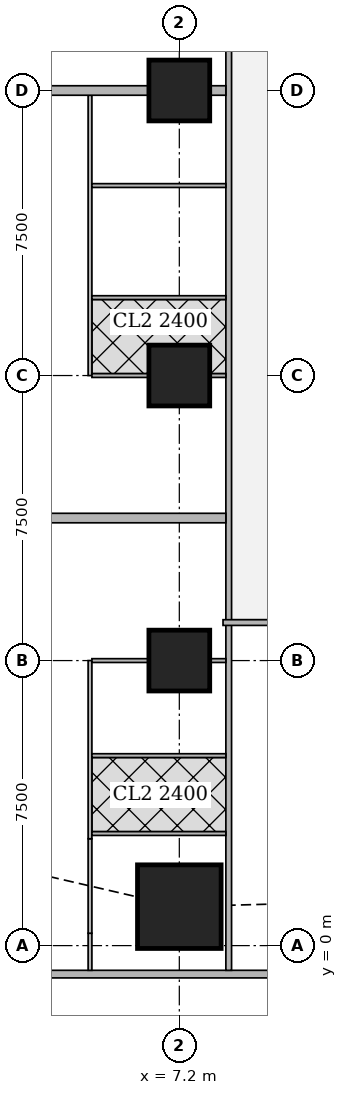
"""IFC4 building model, lengths in metres.
Left out: names, types, materials, properties, quantities, classifications, styles, units other than length and angle.
Written with IfcOpenShell. Run it as: python <this file> out.ifc"""

import sys

from ifc_helpers import new_model, si_unit, direction, frame, frame_2d, origin, origin_2d, place, context, subcontext, project, spatial, rectangle, extrude, element, fill, save


model = new_model("IFC4")
c1 = context("Model", 3, precision=1e-05, world=origin(), true_north=direction((0.0, 1.0)))
c2 = subcontext(c1, "Body", "Model", "MODEL_VIEW")
j1 = project(units=[si_unit("LENGTHUNIT", "METRE"), si_unit("PLANEANGLEUNIT", "RADIAN")], contexts=[c1])
p1 = place(None, origin())
s1 = spatial("IfcSite", under=j1, at=p1, CompositionType="ELEMENT")
p2 = place(p1, origin())
s2 = spatial("IfcBuilding", under=s1, at=p2, CompositionType="ELEMENT")
p3 = place(p2, frame((0.0, 0.0, 111.65)))
s3 = spatial("IfcBuildingStorey", under=s2, at=p3, CompositionType="ELEMENT", Elevation=111.65)
p4 = place(p3, frame((7.2, 1.025, 0.0), z_axis=(0.0, 0.0, 1.0), x_axis=(1.0, 0.0, 0.0)))
e1 = element("IfcColumn", 1, at=p4, inside=s3, PredefinedType="COLUMN", context=c2, shape_type="SweptSolid", body=[
    extrude(rectangle(XDim=2.2, YDim=2.2, at=origin_2d()), origin(), (0.0, 0.0, 1.0), 3.75),
])
for number, where, z_axis, x_axis in (
    (2, (7.2, 7.5, 0.0), (0.0, 0.0, 1.0), (1.0, 0.0, 0.0)),
    (3, (7.2, 15.0, 0.0), (0.0, 0.0, 1.0), (1.0, 0.0, 0.0)),
    (4, (7.2, 22.5, 0.0), (0.0, 0.0, 1.0), (1.0, 0.0, 0.0)),
):
    element("IfcColumn", number, at=place(p3, frame(where, z_axis=z_axis, x_axis=x_axis)), inside=s3, PredefinedType="COLUMN", context=c2, shape_type="SweptSolid", body=[
        extrude(rectangle(XDim=1.6, YDim=1.6, at=origin_2d()), origin(), (0.0, 0.0, 1.0), 3.75),
    ])
p5 = place(p3, frame((2.163, -0.75, 0.0), z_axis=(0.0, 0.0, 1.0), x_axis=(1.0, 0.0, 0.0)))
e5 = element("IfcWall", 5, at=p5, inside=s3, PredefinedType="SOLIDWALL", context=c2, shape_type="SweptSolid", body=[
    extrude(rectangle(XDim=45.628, YDim=0.2, at=frame_2d((22.814, 0.0))), origin(), (0.0, 0.0, 1.0), 3.5),
])
p6 = place(p5, frame((9.537, 0.0, 0.9)))
e6 = element("IfcOpeningElement", 6, at=p6, cuts=e5, PredefinedType="OPENING", context=c2, shape_type="SweptSolid", body=[
    extrude(rectangle(XDim=1.8, YDim=1.5, at=frame_2d((0.9, 0.75))), frame((0.0, 0.11, 0.0), z_axis=(0.0, -1.0, 0.0), x_axis=(1.0, 0.0, 0.0)), (0.0, 0.0, 1.0), 0.22),
])
p7 = place(p5, frame((13.137, 0.0, 0.9)))
e7 = element("IfcOpeningElement", 7, at=p7, cuts=e5, PredefinedType="OPENING", context=c2, shape_type="SweptSolid", body=[
    extrude(rectangle(XDim=1.8, YDim=1.5, at=frame_2d((0.9, 0.75))), frame((0.0, 0.11, 0.0), z_axis=(0.0, -1.0, 0.0), x_axis=(1.0, 0.0, 0.0)), (0.0, 0.0, 1.0), 0.22),
])
p8 = place(p5, frame((16.737, 0.0, 0.9)))
e8 = element("IfcOpeningElement", 8, at=p8, cuts=e5, PredefinedType="OPENING", context=c2, shape_type="SweptSolid", body=[
    extrude(rectangle(XDim=1.8, YDim=1.5, at=frame_2d((0.9, 0.75))), frame((0.0, 0.11, 0.0), z_axis=(0.0, -1.0, 0.0), x_axis=(1.0, 0.0, 0.0)), (0.0, 0.0, 1.0), 0.22),
])
p9 = place(p5, frame((20.337, 0.0, 0.9)))
e9 = element("IfcOpeningElement", 9, at=p9, cuts=e5, PredefinedType="OPENING", context=c2, shape_type="SweptSolid", body=[
    extrude(rectangle(XDim=1.8, YDim=1.5, at=frame_2d((0.9, 0.75))), frame((0.0, 0.11, 0.0), z_axis=(0.0, -1.0, 0.0), x_axis=(1.0, 0.0, 0.0)), (0.0, 0.0, 1.0), 0.22),
])
p10 = place(p5, frame((23.937, 0.0, 0.9)))
e10 = element("IfcOpeningElement", 10, at=p10, cuts=e5, PredefinedType="OPENING", context=c2, shape_type="SweptSolid", body=[
    extrude(rectangle(XDim=1.8, YDim=1.5, at=frame_2d((0.9, 0.75))), frame((0.0, 0.11, 0.0), z_axis=(0.0, -1.0, 0.0), x_axis=(1.0, 0.0, 0.0)), (0.0, 0.0, 1.0), 0.22),
])
p11 = place(p5, frame((27.537, 0.0, 0.9)))
e11 = element("IfcOpeningElement", 11, at=p11, cuts=e5, PredefinedType="OPENING", context=c2, shape_type="SweptSolid", body=[
    extrude(rectangle(XDim=1.8, YDim=1.5, at=frame_2d((0.9, 0.75))), frame((0.0, 0.11, 0.0), z_axis=(0.0, -1.0, 0.0), x_axis=(1.0, 0.0, 0.0)), (0.0, 0.0, 1.0), 0.22),
])
p12 = place(p5, frame((31.137, 0.0, 0.9)))
e12 = element("IfcOpeningElement", 12, at=p12, cuts=e5, PredefinedType="OPENING", context=c2, shape_type="SweptSolid", body=[
    extrude(rectangle(XDim=1.8, YDim=1.5, at=frame_2d((0.9, 0.75))), frame((0.0, 0.11, 0.0), z_axis=(0.0, -1.0, 0.0), x_axis=(1.0, 0.0, 0.0)), (0.0, 0.0, 1.0), 0.22),
])
p13 = place(p5, frame((34.737, 0.0, 0.9)))
e13 = element("IfcOpeningElement", 13, at=p13, cuts=e5, PredefinedType="OPENING", context=c2, shape_type="SweptSolid", body=[
    extrude(rectangle(XDim=1.8, YDim=1.5, at=frame_2d((0.9, 0.75))), frame((0.0, 0.11, 0.0), z_axis=(0.0, -1.0, 0.0), x_axis=(1.0, 0.0, 0.0)), (0.0, 0.0, 1.0), 0.22),
])
p14 = place(p3, frame((8.5, -0.65, 0.0), z_axis=(0.0, 0.0, 1.0), x_axis=(0.0, 1.0, 0.0)))
e14 = element("IfcWall", 14, at=p14, inside=s3, PredefinedType="SOLIDWALL", context=c2, shape_type="SweptSolid", body=[
    extrude(rectangle(XDim=46.3, YDim=0.15, at=frame_2d((23.15, 0.0))), origin(), (0.0, 0.0, 1.0), 2.2),
])
p15 = place(p14, frame((9.525, 0.0, 0.0)))
e15 = element("IfcOpeningElement", 15, at=p15, cuts=e14, PredefinedType="OPENING", context=c2, shape_type="SweptSolid", body=[
    extrude(rectangle(XDim=1.0, YDim=2.1, at=frame_2d((0.5, 1.05))), frame((0.0, 0.085, 0.0), z_axis=(0.0, -1.0, 0.0), x_axis=(1.0, 0.0, 0.0)), (0.0, 0.0, 1.0), 0.17),
])
p16 = place(p14, frame((13.275, 0.0, 0.0)))
e16 = element("IfcOpeningElement", 16, at=p16, cuts=e14, PredefinedType="OPENING", context=c2, shape_type="SweptSolid", body=[
    extrude(rectangle(XDim=1.0, YDim=2.1, at=frame_2d((0.5, 1.05))), frame((0.0, 0.085, 0.0), z_axis=(0.0, -1.0, 0.0), x_axis=(1.0, 0.0, 0.0)), (0.0, 0.0, 1.0), 0.17),
])
p17 = place(p14, frame((25.15, 0.0, 0.0)))
e17 = element("IfcOpeningElement", 17, at=p17, cuts=e14, PredefinedType="OPENING", context=c2, shape_type="SweptSolid", body=[
    extrude(rectangle(XDim=1.0, YDim=2.1, at=frame_2d((0.5, 1.05))), frame((0.0, 0.085, 0.0), z_axis=(0.0, -1.0, 0.0), x_axis=(1.0, 0.0, 0.0)), (0.0, 0.0, 1.0), 0.17),
])
p18 = place(p3, frame((40.053, 8.5, 0.0), z_axis=(0.0, 0.0, 1.0), x_axis=(-1.0, 0.0, 0.0)))
e18 = element("IfcWall", 18, at=p18, inside=s3, PredefinedType="SOLIDWALL", context=c2, shape_type="SweptSolid", body=[
    extrude(rectangle(XDim=31.703, YDim=0.15, at=frame_2d((15.852, 0.0))), origin(), (0.0, 0.0, 1.0), 3.5),
])
p19 = place(p18, frame((28.103, 0.0, 0.0)))
e19 = element("IfcOpeningElement", 19, at=p19, cuts=e18, PredefinedType="OPENING", context=c2, shape_type="SweptSolid", body=[
    extrude(rectangle(XDim=1.0, YDim=2.1, at=frame_2d((0.5, 1.05))), frame((0.0, 0.085, 0.0), z_axis=(0.0, -1.0, 0.0), x_axis=(1.0, 0.0, 0.0)), (0.0, 0.0, 1.0), 0.17),
])
p20 = place(p18, frame((19.754, 0.0, 0.0)))
e20 = element("IfcOpeningElement", 20, at=p20, cuts=e18, PredefinedType="OPENING", context=c2, shape_type="SweptSolid", body=[
    extrude(rectangle(XDim=1.0, YDim=2.1, at=frame_2d((0.5, 1.05))), frame((0.0, 0.085, 0.0), z_axis=(0.0, -1.0, 0.0), x_axis=(1.0, 0.0, 0.0)), (0.0, 0.0, 1.0), 0.17),
])
p21 = place(p18, frame((8.353, 0.0, 0.0)))
e21 = element("IfcOpeningElement", 21, at=p21, cuts=e18, PredefinedType="OPENING", context=c2, shape_type="SweptSolid", body=[
    extrude(rectangle(XDim=1.0, YDim=2.1, at=frame_2d((0.5, 1.05))), frame((0.0, 0.085, 0.0), z_axis=(0.0, -1.0, 0.0), x_axis=(1.0, 0.0, 0.0)), (0.0, 0.0, 1.0), 0.17),
])
p22 = place(p3, frame((4.85, -0.65, 0.0), z_axis=(0.0, 0.0, 1.0), x_axis=(0.0, 1.0, 0.0)))
e22 = element("IfcWall", 22, at=p22, inside=s3, PredefinedType="PARTITIONING", context=c2, shape_type="SweptSolid", body=[
    extrude(rectangle(XDim=0.976, YDim=0.1, at=frame_2d((0.488, 0.0))), origin(), (0.0, 0.0, 1.0), 3.5),
])
p23 = place(p3, frame((4.85, 0.326, 0.0), z_axis=(0.0, 0.0, 1.0), x_axis=(0.0, 1.0, 0.0)))
e23 = element("IfcWall", 23, at=p23, inside=s3, PredefinedType="PARTITIONING", context=c2, shape_type="SweptSolid", body=[
    extrude(rectangle(XDim=2.486, YDim=0.1, at=frame_2d((1.243, 0.0))), origin(), (0.0, 0.0, 1.0), 2.05),
])
p24 = place(p3, frame((4.85, 2.812, 0.0), z_axis=(0.0, 0.0, 1.0), x_axis=(0.0, 1.0, 0.0)))
e24 = element("IfcWall", 24, at=p24, inside=s3, PredefinedType="PARTITIONING", context=c2, shape_type="SweptSolid", body=[
    extrude(rectangle(XDim=4.688, YDim=0.1, at=frame_2d((2.344, 0.0))), origin(), (0.0, 0.0, 1.0), 3.5),
])
p25 = place(p24, frame((2.987, 0.0, 0.0)))
e25 = element("IfcOpeningElement", 25, at=p25, cuts=e24, PredefinedType="OPENING", context=c2, shape_type="SweptSolid", body=[
    extrude(rectangle(XDim=0.9, YDim=2.1, at=frame_2d((0.45, 1.05))), frame((0.0, 0.06, 0.0), z_axis=(0.0, -1.0, 0.0), x_axis=(1.0, 0.0, 0.0)), (0.0, 0.0, 1.0), 0.12),
])
p26 = place(p24, frame((0.712, 0.0, 0.0)))
e26 = element("IfcOpeningElement", 26, at=p26, cuts=e24, PredefinedType="OPENING", context=c2, shape_type="SweptSolid", body=[
    extrude(rectangle(XDim=0.9, YDim=2.1, at=frame_2d((0.45, 1.05))), frame((0.0, 0.06, 0.0), z_axis=(0.0, -1.0, 0.0), x_axis=(1.0, 0.0, 0.0)), (0.0, 0.0, 1.0), 0.12),
])
p27 = place(p3, frame((4.9, 4.999, 0.0), z_axis=(0.0, 0.0, 1.0), x_axis=(1.0, 0.0, 0.0)))
e27 = element("IfcWall", 27, at=p27, inside=s3, PredefinedType="PARTITIONING", context=c2, shape_type="SweptSolid", body=[
    extrude(rectangle(XDim=3.525, YDim=0.1, at=frame_2d((1.763, 0.0))), origin(), (0.0, 0.0, 1.0), 3.5),
])
p28 = place(p3, frame((4.9, 7.5, 0.0), z_axis=(0.0, 0.0, 1.0), x_axis=(1.0, 0.0, 0.0)))
e28 = element("IfcWall", 28, at=p28, inside=s3, PredefinedType="PARTITIONING", context=c2, shape_type="SweptSolid", body=[
    extrude(rectangle(XDim=1.499, YDim=0.1, at=frame_2d((0.75, 0.0))), origin(), (0.0, 0.0, 1.0), 3.5),
])
p29 = place(p3, frame((8.001, 7.5, 0.0), z_axis=(0.0, 0.0, 1.0), x_axis=(1.0, 0.0, 0.0)))
e29 = element("IfcWall", 29, at=p29, inside=s3, PredefinedType="PARTITIONING", context=c2, shape_type="SweptSolid", body=[
    extrude(rectangle(XDim=0.424, YDim=0.1, at=frame_2d((0.212, 0.0))), origin(), (0.0, 0.0, 1.0), 3.5),
])
p30 = place(p3, frame((4.9, 2.949, 0.0), z_axis=(0.0, 0.0, 1.0), x_axis=(1.0, 0.0, 0.0)))
e30 = element("IfcWall", 30, at=p30, inside=s3, PredefinedType="PARTITIONING", context=c2, shape_type="SweptSolid", body=[
    extrude(rectangle(XDim=3.525, YDim=0.1, at=frame_2d((1.763, 0.0))), origin(), (0.0, 0.0, 1.0), 3.5),
])
p31 = place(p30, frame((0.45, 0.0, 0.0)))
e31 = element("IfcOpeningElement", 31, at=p31, cuts=e30, PredefinedType="OPENING", context=c2, shape_type="SweptSolid", body=[
    extrude(rectangle(XDim=0.9, YDim=2.1, at=frame_2d((0.45, 1.05))), frame((0.0, 0.06, 0.0), z_axis=(0.0, -1.0, 0.0), x_axis=(1.0, 0.0, 0.0)), (0.0, 0.0, 1.0), 0.12),
])
p32 = place(p3, frame((4.85, 15.0, 0.0), z_axis=(0.0, 0.0, 1.0), x_axis=(0.0, 1.0, 0.0)))
e32 = element("IfcWall", 32, at=p32, inside=s3, PredefinedType="PARTITIONING", context=c2, shape_type="SweptSolid", body=[
    extrude(rectangle(XDim=7.375, YDim=0.1, at=frame_2d((3.688, 0.0))), origin(), (0.0, 0.0, 1.0), 3.5),
])
p33 = place(p32, frame((0.575, 0.0, 0.0)))
e33 = element("IfcOpeningElement", 33, at=p33, cuts=e32, PredefinedType="OPENING", context=c2, shape_type="SweptSolid", body=[
    extrude(rectangle(XDim=0.9, YDim=2.1, at=frame_2d((0.45, 1.05))), frame((0.0, 0.06, 0.0), z_axis=(0.0, -1.0, 0.0), x_axis=(1.0, 0.0, 0.0)), (0.0, 0.0, 1.0), 0.12),
])
p34 = place(p32, frame((5.799, 0.0, 0.0)))
e34 = element("IfcOpeningElement", 34, at=p34, cuts=e32, PredefinedType="OPENING", context=c2, shape_type="SweptSolid", body=[
    extrude(rectangle(XDim=0.9, YDim=2.1, at=frame_2d((0.45, 1.05))), frame((0.0, 0.06, 0.0), z_axis=(0.0, -1.0, 0.0), x_axis=(1.0, 0.0, 0.0)), (0.0, 0.0, 1.0), 0.12),
])
p35 = place(p32, frame((3.074, 0.0, 0.0)))
e35 = element("IfcOpeningElement", 35, at=p35, cuts=e32, PredefinedType="OPENING", context=c2, shape_type="SweptSolid", body=[
    extrude(rectangle(XDim=0.9, YDim=2.1, at=frame_2d((0.45, 1.05))), frame((0.0, 0.06, 0.0), z_axis=(0.0, -1.0, 0.0), x_axis=(1.0, 0.0, 0.0)), (0.0, 0.0, 1.0), 0.12),
])
p36 = place(p3, frame((4.9, 15.0, 0.0), z_axis=(0.0, 0.0, 1.0), x_axis=(1.0, 0.0, 0.0)))
e36 = element("IfcWall", 36, at=p36, inside=s3, PredefinedType="PARTITIONING", context=c2, shape_type="SweptSolid", body=[
    extrude(rectangle(XDim=1.499, YDim=0.1, at=frame_2d((0.75, 0.0))), origin(), (0.0, 0.0, 1.0), 3.5),
])
p37 = place(p3, frame((8.001, 15.0, 0.0), z_axis=(0.0, 0.0, 1.0), x_axis=(1.0, 0.0, 0.0)))
e37 = element("IfcWall", 37, at=p37, inside=s3, PredefinedType="PARTITIONING", context=c2, shape_type="SweptSolid", body=[
    extrude(rectangle(XDim=0.424, YDim=0.1, at=frame_2d((0.212, 0.0))), origin(), (0.0, 0.0, 1.0), 3.5),
])
for number, where, z_axis, x_axis in (
    (38, (4.9, 19.999, 0.0), (0.0, 0.0, 1.0), (1.0, 0.0, 0.0)),
    (39, (4.9, 17.05, 0.0), (0.0, 0.0, 1.0), (1.0, 0.0, 0.0)),
):
    element("IfcWall", number, at=place(p3, frame(where, z_axis=z_axis, x_axis=x_axis)), inside=s3, PredefinedType="PARTITIONING", context=c2, shape_type="SweptSolid", body=[
        extrude(rectangle(XDim=3.525, YDim=0.1, at=frame_2d((1.763, 0.0))), origin(), (0.0, 0.0, 1.0), 3.5),
    ])
p38 = place(p3, frame((3.65, 11.25, 0.0), z_axis=(0.0, 0.0, 1.0), x_axis=(1.0, 0.0, 0.0)))
e40 = element("IfcWall", 40, at=p38, inside=s3, PredefinedType="SOLIDWALL", context=c2, shape_type="SweptSolid", body=[
    extrude(rectangle(XDim=4.775, YDim=0.25, at=frame_2d((2.388, 0.0))), origin(), (0.0, 0.0, 1.0), 3.5),
])
p39 = place(p3, frame((3.65, 22.5, 0.0), z_axis=(0.0, 0.0, 1.0), x_axis=(1.0, 0.0, 0.0)))
e41 = element("IfcWall", 41, at=p39, inside=s3, PredefinedType="SOLIDWALL", context=c2, shape_type="SweptSolid", body=[
    extrude(rectangle(XDim=2.749, YDim=0.25, at=frame_2d((1.375, 0.0))), origin(), (0.0, 0.0, 1.0), 3.5),
])
p40 = place(p3, frame((8.001, 22.5, 0.0), z_axis=(0.0, 0.0, 1.0), x_axis=(1.0, 0.0, 0.0)))
e42 = element("IfcWall", 42, at=p40, inside=s3, PredefinedType="SOLIDWALL", context=c2, shape_type="SweptSolid", body=[
    extrude(rectangle(XDim=0.424, YDim=0.25, at=frame_2d((0.212, 0.0))), origin(), (0.0, 0.0, 1.0), 3.5),
])
p41 = place(p25, origin())
e43 = element("IfcDoor", 43, at=p41, inside=s3, OperationType="SINGLE_SWING_LEFT", PredefinedType="DOOR", context=c2, shape_type="SweptSolid", body=[
    extrude(rectangle(XDim=0.9, YDim=2.1, at=frame_2d((0.45, 1.05))), frame((0.0, 0.025, 0.0), z_axis=(0.0, -1.0, 0.0), x_axis=(1.0, 0.0, 0.0)), (0.0, 0.0, 1.0), 0.05),
])
fill(e25, e43)
p42 = place(p26, origin())
e44 = element("IfcDoor", 44, at=p42, inside=s3, OperationType="SINGLE_SWING_RIGHT", PredefinedType="DOOR", context=c2, shape_type="SweptSolid", body=[
    extrude(rectangle(XDim=0.9, YDim=2.1, at=frame_2d((0.45, 1.05))), frame((0.0, 0.025, 0.0), z_axis=(0.0, -1.0, 0.0), x_axis=(1.0, 0.0, 0.0)), (0.0, 0.0, 1.0), 0.05),
])
fill(e26, e44)
p43 = place(p31, origin())
e45 = element("IfcDoor", 45, at=p43, inside=s3, OperationType="SINGLE_SWING_LEFT", PredefinedType="DOOR", context=c2, shape_type="SweptSolid", body=[
    extrude(rectangle(XDim=0.9, YDim=2.1, at=frame_2d((0.45, 1.05))), frame((0.0, 0.025, 0.0), z_axis=(0.0, -1.0, 0.0), x_axis=(1.0, 0.0, 0.0)), (0.0, 0.0, 1.0), 0.05),
])
fill(e31, e45)
p44 = place(p15, origin())
e46 = element("IfcDoor", 46, at=p44, inside=s3, OperationType="SINGLE_SWING_LEFT", PredefinedType="DOOR", context=c2, shape_type="SweptSolid", body=[
    extrude(rectangle(XDim=1.0, YDim=2.1, at=frame_2d((0.5, 1.05))), frame((0.0, 0.025, 0.0), z_axis=(0.0, -1.0, 0.0), x_axis=(1.0, 0.0, 0.0)), (0.0, 0.0, 1.0), 0.05),
])
fill(e15, e46)
p45 = place(p33, origin())
e47 = element("IfcDoor", 47, at=p45, inside=s3, OperationType="SINGLE_SWING_RIGHT", PredefinedType="DOOR", context=c2, shape_type="SweptSolid", body=[
    extrude(rectangle(XDim=0.9, YDim=2.1, at=frame_2d((0.45, 1.05))), frame((0.0, 0.025, 0.0), z_axis=(0.0, -1.0, 0.0), x_axis=(1.0, 0.0, 0.0)), (0.0, 0.0, 1.0), 0.05),
])
fill(e33, e47)
p46 = place(p34, origin())
e48 = element("IfcDoor", 48, at=p46, inside=s3, OperationType="SINGLE_SWING_LEFT", PredefinedType="DOOR", context=c2, shape_type="SweptSolid", body=[
    extrude(rectangle(XDim=0.9, YDim=2.1, at=frame_2d((0.45, 1.05))), frame((0.0, 0.025, 0.0), z_axis=(0.0, -1.0, 0.0), x_axis=(1.0, 0.0, 0.0)), (0.0, 0.0, 1.0), 0.05),
])
fill(e34, e48)
p47 = place(p35, origin())
e49 = element("IfcDoor", 49, at=p47, inside=s3, OperationType="SINGLE_SWING_LEFT", PredefinedType="DOOR", context=c2, shape_type="SweptSolid", body=[
    extrude(rectangle(XDim=0.9, YDim=2.1, at=frame_2d((0.45, 1.05))), frame((0.0, 0.025, 0.0), z_axis=(0.0, -1.0, 0.0), x_axis=(1.0, 0.0, 0.0)), (0.0, 0.0, 1.0), 0.05),
])
fill(e35, e49)
p48 = place(p16, origin())
e50 = element("IfcDoor", 50, at=p48, inside=s3, OperationType="SINGLE_SWING_RIGHT", PredefinedType="DOOR", context=c2, shape_type="SweptSolid", body=[
    extrude(rectangle(XDim=1.0, YDim=2.1, at=frame_2d((0.5, 1.05))), frame((0.0, 0.025, 0.0), z_axis=(0.0, -1.0, 0.0), x_axis=(1.0, 0.0, 0.0)), (0.0, 0.0, 1.0), 0.05),
])
fill(e16, e50)
save(model, sys.argv[1])
